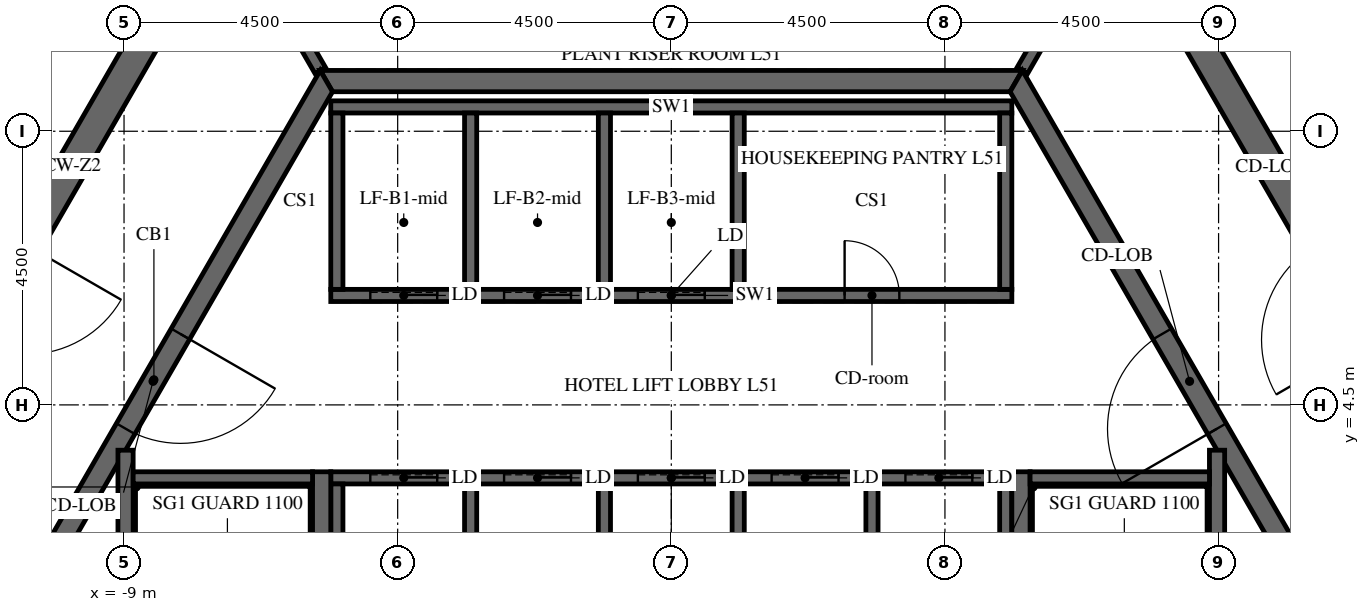
"""IFC4 building model, lengths in metres.
Left out: names, types, materials, properties, quantities, classifications, styles, units other than length and angle.
Written with IfcOpenShell. Run it as: python <this file> out.ifc"""

import sys

from ifc_helpers import new_model, si_unit, direction, frame, frame_2d, origin, place, context, subcontext, project, spatial, polyline, rectangle, outline, extrude, element, fill, save


model = new_model("IFC4")
c1 = context("Model", 3, precision=1e-05, world=origin(), true_north=direction((0.0, 1.0)))
c2 = subcontext(c1, "Body", "Model", "MODEL_VIEW")
j1 = project(units=[si_unit("LENGTHUNIT", "METRE"), si_unit("PLANEANGLEUNIT", "RADIAN")], contexts=[c1])
p1 = place(None, origin())
s1 = spatial("IfcSite", under=j1, at=p1, CompositionType="ELEMENT")
p2 = place(p1, origin())
s2 = spatial("IfcBuilding", under=s1, at=p2, CompositionType="ELEMENT")
p3 = place(p2, frame((0.0, 0.0, 215.1)))
s3 = spatial("IfcBuildingStorey", under=s2, at=p3, CompositionType="ELEMENT", Elevation=215.1)
p4 = place(p3, frame((-7.361, 12.75, -0.15), z_axis=(0.0, 0.0, 1.0), x_axis=(-0.50000571537, -0.866022103989, 0.0)))
e1 = element("IfcWall", 1, at=p4, inside=s3, PredefinedType="SHEAR", context=c2, shape_type="SweptSolid", body=[
    extrude(outline(polyline([(-0.144, -0.25), (14.867, -0.25), (14.578, 0.25), (0.144, 0.25), (-0.144, -0.25)])), origin(), (0.0, 0.0, 1.0), 3.9),
])
p5 = place(p4, frame((6.49, 0.0, 0.15)))
e2 = element("IfcOpeningElement", 2, at=p5, cuts=e1, PredefinedType="OPENING", context=c2, shape_type="SweptSolid", body=[
    extrude(rectangle(XDim=1.8, YDim=2.4, at=frame_2d((0.9, 1.2))), frame((0.0, 0.26, 0.0), z_axis=(0.0, -1.0, 0.0), x_axis=(1.0, 0.0, 0.0)), (0.0, 0.0, 1.0), 0.52),
])
p6 = place(p3, frame((14.722, 0.0, -0.15), z_axis=(0.0, 0.0, 1.0), x_axis=(-0.50000571537, 0.866022103989, 0.0)))
e3 = element("IfcWall", 3, at=p6, inside=s3, PredefinedType="SHEAR", context=c2, shape_type="SweptSolid", body=[
    extrude(outline(polyline([(-0.144, -0.25), (14.867, -0.25), (14.578, 0.25), (0.144, 0.25), (-0.144, -0.25)])), origin(), (0.0, 0.0, 1.0), 3.9),
])
p7 = place(p6, frame((6.432, 0.0, 0.15)))
e4 = element("IfcOpeningElement", 4, at=p7, cuts=e3, PredefinedType="OPENING", context=c2, shape_type="SweptSolid", body=[
    extrude(rectangle(XDim=1.8, YDim=2.4, at=frame_2d((0.9, 1.2))), frame((0.0, 0.26, 0.0), z_axis=(0.0, -1.0, 0.0), x_axis=(1.0, 0.0, 0.0)), (0.0, 0.0, 1.0), 0.52),
])
p8 = place(p3, frame((-5.673, 9.825, -0.15), z_axis=(0.0, 0.0, 1.0), x_axis=(-0.499995046907, -0.866028263435, 0.0)))
e5 = element("IfcWall", 5, at=p8, inside=s3, PredefinedType="SHEAR", context=c2, shape_type="SweptSolid", body=[
    extrude(outline(polyline([(-0.101, -0.175), (11.446, -0.175), (11.244, 0.175), (0.101, 0.175), (-0.101, -0.175)])), origin(), (0.0, 0.0, 1.0), 3.9),
])
p9 = place(p8, frame((4.801, 0.0, 0.15)))
e6 = element("IfcOpeningElement", 6, at=p9, cuts=e5, PredefinedType="OPENING", context=c2, shape_type="SweptSolid", body=[
    extrude(rectangle(XDim=1.8, YDim=2.4, at=frame_2d((0.9, 1.2))), frame((0.0, 0.185, 0.0), z_axis=(0.0, -1.0, 0.0), x_axis=(1.0, 0.0, 0.0)), (0.0, 0.0, 1.0), 0.37),
])
p10 = place(p3, frame((11.345, 0.0, -0.15), z_axis=(0.0, 0.0, 1.0), x_axis=(-0.499995046907, 0.866028263435, 0.0)))
e7 = element("IfcWall", 7, at=p10, inside=s3, PredefinedType="SHEAR", context=c2, shape_type="SweptSolid", body=[
    extrude(outline(polyline([(-0.101, -0.175), (11.446, -0.175), (11.244, 0.175), (0.101, 0.175), (-0.101, -0.175)])), origin(), (0.0, 0.0, 1.0), 3.9),
])
p11 = place(p10, frame((4.744, 0.0, 0.15)))
e8 = element("IfcOpeningElement", 8, at=p11, cuts=e7, PredefinedType="OPENING", context=c2, shape_type="SweptSolid", body=[
    extrude(rectangle(XDim=1.8, YDim=2.4, at=frame_2d((0.9, 1.2))), frame((0.0, 0.185, 0.0), z_axis=(0.0, -1.0, 0.0), x_axis=(1.0, 0.0, 0.0)), (0.0, 0.0, 1.0), 0.37),
])
p12 = place(p3, frame((5.673, 9.825, -0.15), z_axis=(0.0, 0.0, 1.0), x_axis=(-1.0, 0.0, 0.0)))
e9 = element("IfcWall", 9, at=p12, inside=s3, PredefinedType="SHEAR", context=c2, shape_type="SweptSolid", body=[
    extrude(outline(polyline([(-0.101, -0.175), (11.446, -0.175), (11.244, 0.175), (0.101, 0.175), (-0.101, -0.175)])), origin(), (0.0, 0.0, 1.0), 3.9),
])
p13 = place(p3, frame((-5.6, 6.3, -0.25), z_axis=(0.0, 0.0, 1.0), x_axis=(1.0, 0.0, 0.0)))
e10 = element("IfcWall", 10, at=p13, inside=s3, PredefinedType="SHEAR", context=c2, shape_type="SweptSolid", body=[
    extrude(rectangle(XDim=11.2, YDim=0.2, at=frame_2d((5.6, 0.0))), origin(), (0.0, 0.0, 1.0), 3.9),
])
p14 = place(p13, frame((8.45, 0.0, 0.25)))
e11 = element("IfcOpeningElement", 11, at=p14, cuts=e10, PredefinedType="OPENING", context=c2, shape_type="SweptSolid", body=[
    extrude(rectangle(XDim=0.9, YDim=2.1, at=frame_2d((0.45, 1.05))), frame((0.0, 0.11, 0.0), z_axis=(0.0, -1.0, 0.0), x_axis=(1.0, 0.0, 0.0)), (0.0, 0.0, 1.0), 0.22),
])
p15 = place(p13, frame((0.65, 0.0, 0.25)))
e12 = element("IfcOpeningElement", 12, at=p15, cuts=e10, PredefinedType="OPENING", context=c2, shape_type="SweptSolid", body=[
    extrude(rectangle(XDim=1.1, YDim=2.1, at=frame_2d((0.55, 1.05))), frame((0.0, 0.11, 0.0), z_axis=(0.0, -1.0, 0.0), x_axis=(1.0, 0.0, 0.0)), (0.0, 0.0, 1.0), 0.22),
])
p16 = place(p13, frame((2.85, 0.0, 0.25)))
e13 = element("IfcOpeningElement", 13, at=p16, cuts=e10, PredefinedType="OPENING", context=c2, shape_type="SweptSolid", body=[
    extrude(rectangle(XDim=1.1, YDim=2.1, at=frame_2d((0.55, 1.05))), frame((0.0, 0.11, 0.0), z_axis=(0.0, -1.0, 0.0), x_axis=(1.0, 0.0, 0.0)), (0.0, 0.0, 1.0), 0.22),
])
p17 = place(p13, frame((5.05, 0.0, 0.25)))
e14 = element("IfcOpeningElement", 14, at=p17, cuts=e10, PredefinedType="OPENING", context=c2, shape_type="SweptSolid", body=[
    extrude(rectangle(XDim=1.1, YDim=2.1, at=frame_2d((0.55, 1.05))), frame((0.0, 0.11, 0.0), z_axis=(0.0, -1.0, 0.0), x_axis=(1.0, 0.0, 0.0)), (0.0, 0.0, 1.0), 0.22),
])
p18 = place(p3, frame((-5.6, 9.4, -0.25), z_axis=(0.0, 0.0, 1.0), x_axis=(1.0, 0.0, 0.0)))
e15 = element("IfcWall", 15, at=p18, inside=s3, PredefinedType="SHEAR", context=c2, shape_type="SweptSolid", body=[
    extrude(rectangle(XDim=11.2, YDim=0.2, at=frame_2d((5.6, 0.0))), origin(), (0.0, 0.0, 1.0), 3.9),
])
for number, where, z_axis, x_axis in (
    (16, (-5.5, 6.4, -0.25), (0.0, 0.0, 1.0), (0.0, 1.0, 0.0)),
    (17, (-3.3, 6.4, -0.25), (0.0, 0.0, 1.0), (0.0, 1.0, 0.0)),
    (18, (-1.1, 6.4, -0.25), (0.0, 0.0, 1.0), (0.0, 1.0, 0.0)),
    (19, (1.1, 6.4, -0.25), (0.0, 0.0, 1.0), (0.0, 1.0, 0.0)),
    (20, (5.5, 6.4, -0.25), (0.0, 0.0, 1.0), (0.0, 1.0, 0.0)),
):
    element("IfcWall", number, at=place(p3, frame(where, z_axis=z_axis, x_axis=x_axis)), inside=s3, PredefinedType="SHEAR", context=c2, shape_type="SweptSolid", body=[
        extrude(rectangle(XDim=2.9, YDim=0.2, at=frame_2d((1.45, 0.0))), origin(), (0.0, 0.0, 1.0), 3.9),
    ])
p19 = place(p3, frame((-5.6, 3.3, -0.25), z_axis=(0.0, 0.0, 1.0), x_axis=(1.0, 0.0, 0.0)))
e21 = element("IfcWall", 21, at=p19, inside=s3, PredefinedType="SHEAR", context=c2, shape_type="SweptSolid", body=[
    extrude(rectangle(XDim=11.2, YDim=0.2, at=frame_2d((5.6, 0.0))), origin(), (0.0, 0.0, 1.0), 3.9),
])
p20 = place(p19, frame((0.65, 0.0, 0.25)))
e22 = element("IfcOpeningElement", 22, at=p20, cuts=e21, PredefinedType="OPENING", context=c2, shape_type="SweptSolid", body=[
    extrude(rectangle(XDim=1.1, YDim=2.1, at=frame_2d((0.55, 1.05))), frame((0.0, 0.11, 0.0), z_axis=(0.0, -1.0, 0.0), x_axis=(1.0, 0.0, 0.0)), (0.0, 0.0, 1.0), 0.22),
])
p21 = place(p19, frame((2.85, 0.0, 0.25)))
e23 = element("IfcOpeningElement", 23, at=p21, cuts=e21, PredefinedType="OPENING", context=c2, shape_type="SweptSolid", body=[
    extrude(rectangle(XDim=1.1, YDim=2.1, at=frame_2d((0.55, 1.05))), frame((0.0, 0.11, 0.0), z_axis=(0.0, -1.0, 0.0), x_axis=(1.0, 0.0, 0.0)), (0.0, 0.0, 1.0), 0.22),
])
p22 = place(p19, frame((5.05, 0.0, 0.25)))
e24 = element("IfcOpeningElement", 24, at=p22, cuts=e21, PredefinedType="OPENING", context=c2, shape_type="SweptSolid", body=[
    extrude(rectangle(XDim=1.1, YDim=2.1, at=frame_2d((0.55, 1.05))), frame((0.0, 0.11, 0.0), z_axis=(0.0, -1.0, 0.0), x_axis=(1.0, 0.0, 0.0)), (0.0, 0.0, 1.0), 0.22),
])
p23 = place(p19, frame((7.25, 0.0, 0.25)))
e25 = element("IfcOpeningElement", 25, at=p23, cuts=e21, PredefinedType="OPENING", context=c2, shape_type="SweptSolid", body=[
    extrude(rectangle(XDim=1.1, YDim=2.1, at=frame_2d((0.55, 1.05))), frame((0.0, 0.11, 0.0), z_axis=(0.0, -1.0, 0.0), x_axis=(1.0, 0.0, 0.0)), (0.0, 0.0, 1.0), 0.22),
])
p24 = place(p19, frame((9.45, 0.0, 0.25)))
e26 = element("IfcOpeningElement", 26, at=p24, cuts=e21, PredefinedType="OPENING", context=c2, shape_type="SweptSolid", body=[
    extrude(rectangle(XDim=1.1, YDim=2.1, at=frame_2d((0.55, 1.05))), frame((0.0, 0.11, 0.0), z_axis=(0.0, -1.0, 0.0), x_axis=(1.0, 0.0, 0.0)), (0.0, 0.0, 1.0), 0.22),
])
for number, where, z_axis, x_axis in (
    (27, (-5.5, 0.1, -0.25), (0.0, 0.0, 1.0), (0.0, 1.0, 0.0)),
    (28, (-3.3, 0.1, -0.25), (0.0, 0.0, 1.0), (0.0, 1.0, 0.0)),
    (29, (-1.1, 0.1, -0.25), (0.0, 0.0, 1.0), (0.0, 1.0, 0.0)),
    (30, (1.1, 0.1, -0.25), (0.0, 0.0, 1.0), (0.0, 1.0, 0.0)),
    (31, (3.3, 0.1, -0.25), (0.0, 0.0, 1.0), (0.0, 1.0, 0.0)),
    (32, (5.5, 0.1, -0.25), (0.0, 0.0, 1.0), (0.0, 1.0, 0.0)),
):
    element("IfcWall", number, at=place(p3, frame(where, z_axis=z_axis, x_axis=x_axis)), inside=s3, PredefinedType="SHEAR", context=c2, shape_type="SweptSolid", body=[
        extrude(rectangle(XDim=3.1, YDim=0.2, at=frame_2d((1.55, 0.0))), origin(), (0.0, 0.0, 1.0), 3.9),
    ])
for number, where, z_axis, x_axis in (
    (33, (5.773, 10.0, -0.15), (0.0, 0.0, 1.0), (0.5, 0.866, 0.0)),
    (34, (-5.773, 10.0, -0.15), (0.0, 0.0, 1.0), (-0.5, 0.866, 0.0)),
):
    element("IfcWall", number, at=place(p3, frame(where, z_axis=z_axis, x_axis=x_axis)), inside=s3, PredefinedType="SHEAR", context=c2, shape_type="SweptSolid", body=[
        extrude(rectangle(XDim=2.887, YDim=0.2, at=frame_2d((1.443, 0.0))), origin(), (0.0, 0.0, 1.0), 3.9),
    ])
p25 = place(p3, frame((5.75, -3.4, -0.25), z_axis=(0.0, 0.0, 1.0), x_axis=(0.0, 1.0, 0.0)))
e35 = element("IfcWall", 35, at=p25, inside=s3, PredefinedType="SHEAR", context=c2, shape_type="SweptSolid", body=[
    extrude(rectangle(XDim=6.8, YDim=0.3, at=frame_2d((3.4, 0.0))), origin(), (0.0, 0.0, 1.0), 3.9),
])
p26 = place(p3, frame((8.975, -3.755, -0.25), z_axis=(0.0, 0.0, 1.0), x_axis=(0.0, 1.0, 0.0)))
e36 = element("IfcWall", 36, at=p26, inside=s3, PredefinedType="SHEAR", context=c2, shape_type="SweptSolid", body=[
    extrude(rectangle(XDim=7.51, YDim=0.25, at=frame_2d((3.755, 0.0))), origin(), (0.0, 0.0, 1.0), 3.9),
])
p27 = place(p3, frame((5.9, 3.3, -0.25), z_axis=(0.0, 0.0, 1.0), x_axis=(1.0, 0.0, 0.0)))
e37 = element("IfcWall", 37, at=p27, inside=s3, PredefinedType="SHEAR", context=c2, shape_type="SweptSolid", body=[
    extrude(rectangle(XDim=2.95, YDim=0.2, at=frame_2d((1.475, 0.0))), origin(), (0.0, 0.0, 1.0), 3.9),
])
p28 = place(p3, frame((-5.75, -3.4, -0.25), z_axis=(0.0, 0.0, 1.0), x_axis=(0.0, 1.0, 0.0)))
e38 = element("IfcWall", 38, at=p28, inside=s3, PredefinedType="SHEAR", context=c2, shape_type="SweptSolid", body=[
    extrude(rectangle(XDim=6.8, YDim=0.3, at=frame_2d((3.4, 0.0))), origin(), (0.0, 0.0, 1.0), 3.9),
])
p29 = place(p3, frame((-8.975, -3.755, -0.25), z_axis=(0.0, 0.0, 1.0), x_axis=(0.0, 1.0, 0.0)))
e39 = element("IfcWall", 39, at=p29, inside=s3, PredefinedType="SHEAR", context=c2, shape_type="SweptSolid", body=[
    extrude(rectangle(XDim=7.51, YDim=0.25, at=frame_2d((3.755, 0.0))), origin(), (0.0, 0.0, 1.0), 3.9),
])
p30 = place(p3, frame((-8.85, 3.3, -0.25), z_axis=(0.0, 0.0, 1.0), x_axis=(1.0, 0.0, 0.0)))
e40 = element("IfcWall", 40, at=p30, inside=s3, PredefinedType="SHEAR", context=c2, shape_type="SweptSolid", body=[
    extrude(rectangle(XDim=2.95, YDim=0.2, at=frame_2d((1.475, 0.0))), origin(), (0.0, 0.0, 1.0), 3.9),
])
p31 = place(p3, frame((-8.588, 14.725, 0.0), z_axis=(0.0, 0.0, 1.0), x_axis=(-0.499999403554, -0.866025748143, 0.0)))
e41 = element("IfcWall", 41, at=p31, inside=s3, PredefinedType="PARTITIONING", context=c2, shape_type="SweptSolid", body=[
    extrude(rectangle(XDim=14.549, YDim=0.15, at=frame_2d((7.275, 0.0))), origin(), (0.0, 0.0, 1.0), 2.988),
])
p32 = place(p31, frame((1.781, 0.0, 0.0)))
e42 = element("IfcOpeningElement", 42, at=p32, cuts=e41, PredefinedType="OPENING", context=c2, shape_type="SweptSolid", body=[
    extrude(rectangle(XDim=1.0, YDim=2.1, at=frame_2d((0.5, 1.05))), frame((0.0, 0.085, 0.0), z_axis=(0.0, -1.0, 0.0), x_axis=(1.0, 0.0, 0.0)), (0.0, 0.0, 1.0), 0.17),
])
p33 = place(p31, frame((8.705, 0.0, 0.0)))
e43 = element("IfcOpeningElement", 43, at=p33, cuts=e41, PredefinedType="OPENING", context=c2, shape_type="SweptSolid", body=[
    extrude(rectangle(XDim=1.0, YDim=2.1, at=frame_2d((0.5, 1.05))), frame((0.0, 0.085, 0.0), z_axis=(0.0, -1.0, 0.0), x_axis=(1.0, 0.0, 0.0)), (0.0, 0.0, 1.0), 0.17),
])
p34 = place(p3, frame((17.046, 0.075, 0.0), z_axis=(0.0, 0.0, 1.0), x_axis=(-0.500008833422, 0.866020303746, 0.0)))
e44 = element("IfcWall", 44, at=p34, inside=s3, PredefinedType="PARTITIONING", context=c2, shape_type="SweptSolid", body=[
    extrude(rectangle(XDim=14.636, YDim=0.15, at=frame_2d((7.318, 0.0))), origin(), (0.0, 0.0, 1.0), 2.988),
])
p35 = place(p34, frame((9.07, 0.0, 0.0)))
e45 = element("IfcOpeningElement", 45, at=p35, cuts=e44, PredefinedType="OPENING", context=c2, shape_type="SweptSolid", body=[
    extrude(rectangle(XDim=1.0, YDim=2.1, at=frame_2d((0.5, 1.05))), frame((0.0, 0.085, 0.0), z_axis=(0.0, -1.0, 0.0), x_axis=(1.0, 0.0, 0.0)), (0.0, 0.0, 1.0), 0.17),
])
p36 = place(p9, origin())
e46 = element("IfcDoor", 46, at=p36, inside=s3, OperationType="DOUBLE_DOOR_SINGLE_SWING", PredefinedType="DOOR", context=c2, shape_type="SweptSolid", body=[
    extrude(rectangle(XDim=1.8, YDim=2.4, at=frame_2d((0.9, 1.2))), frame((0.0, 0.025, 0.0), z_axis=(0.0, -1.0, 0.0), x_axis=(1.0, 0.0, 0.0)), (0.0, 0.0, 1.0), 0.05),
])
fill(e6, e46)
p37 = place(p11, origin())
e47 = element("IfcDoor", 47, at=p37, inside=s3, OperationType="DOUBLE_DOOR_SINGLE_SWING", PredefinedType="DOOR", context=c2, shape_type="SweptSolid", body=[
    extrude(rectangle(XDim=1.8, YDim=2.4, at=frame_2d((0.9, 1.2))), frame((0.0, 0.025, 0.0), z_axis=(0.0, -1.0, 0.0), x_axis=(1.0, 0.0, 0.0)), (0.0, 0.0, 1.0), 0.05),
])
fill(e8, e47)
p38 = place(p14, origin())
e48 = element("IfcDoor", 48, at=p38, inside=s3, OperationType="SINGLE_SWING_LEFT", PredefinedType="DOOR", context=c2, shape_type="SweptSolid", body=[
    extrude(rectangle(XDim=0.9, YDim=2.1, at=frame_2d((0.45, 1.05))), frame((0.0, 0.025, 0.0), z_axis=(0.0, -1.0, 0.0), x_axis=(1.0, 0.0, 0.0)), (0.0, 0.0, 1.0), 0.05),
])
fill(e11, e48)
p39 = place(p15, origin())
e49 = element("IfcDoor", 49, at=p39, inside=s3, OperationType="SLIDING_TO_LEFT", PredefinedType="DOOR", context=c2, shape_type="SweptSolid", body=[
    extrude(rectangle(XDim=1.1, YDim=2.1, at=frame_2d((0.55, 1.05))), frame((0.0, 0.025, 0.0), z_axis=(0.0, -1.0, 0.0), x_axis=(1.0, 0.0, 0.0)), (0.0, 0.0, 1.0), 0.05),
])
fill(e12, e49)
p40 = place(p16, origin())
e50 = element("IfcDoor", 50, at=p40, inside=s3, OperationType="SLIDING_TO_LEFT", PredefinedType="DOOR", context=c2, shape_type="SweptSolid", body=[
    extrude(rectangle(XDim=1.1, YDim=2.1, at=frame_2d((0.55, 1.05))), frame((0.0, 0.025, 0.0), z_axis=(0.0, -1.0, 0.0), x_axis=(1.0, 0.0, 0.0)), (0.0, 0.0, 1.0), 0.05),
])
fill(e13, e50)
p41 = place(p17, origin())
e51 = element("IfcDoor", 51, at=p41, inside=s3, OperationType="SLIDING_TO_LEFT", PredefinedType="DOOR", context=c2, shape_type="SweptSolid", body=[
    extrude(rectangle(XDim=1.1, YDim=2.1, at=frame_2d((0.55, 1.05))), frame((0.0, 0.025, 0.0), z_axis=(0.0, -1.0, 0.0), x_axis=(1.0, 0.0, 0.0)), (0.0, 0.0, 1.0), 0.05),
])
fill(e14, e51)
p42 = place(p20, origin())
e52 = element("IfcDoor", 52, at=p42, inside=s3, OperationType="SLIDING_TO_LEFT", PredefinedType="DOOR", context=c2, shape_type="SweptSolid", body=[
    extrude(rectangle(XDim=1.1, YDim=2.1, at=frame_2d((0.55, 1.05))), frame((0.0, 0.025, 0.0), z_axis=(0.0, -1.0, 0.0), x_axis=(1.0, 0.0, 0.0)), (0.0, 0.0, 1.0), 0.05),
])
fill(e22, e52)
p43 = place(p21, origin())
e53 = element("IfcDoor", 53, at=p43, inside=s3, OperationType="SLIDING_TO_LEFT", PredefinedType="DOOR", context=c2, shape_type="SweptSolid", body=[
    extrude(rectangle(XDim=1.1, YDim=2.1, at=frame_2d((0.55, 1.05))), frame((0.0, 0.025, 0.0), z_axis=(0.0, -1.0, 0.0), x_axis=(1.0, 0.0, 0.0)), (0.0, 0.0, 1.0), 0.05),
])
fill(e23, e53)
p44 = place(p22, origin())
e54 = element("IfcDoor", 54, at=p44, inside=s3, OperationType="SLIDING_TO_LEFT", PredefinedType="DOOR", context=c2, shape_type="SweptSolid", body=[
    extrude(rectangle(XDim=1.1, YDim=2.1, at=frame_2d((0.55, 1.05))), frame((0.0, 0.025, 0.0), z_axis=(0.0, -1.0, 0.0), x_axis=(1.0, 0.0, 0.0)), (0.0, 0.0, 1.0), 0.05),
])
fill(e24, e54)
p45 = place(p23, origin())
e55 = element("IfcDoor", 55, at=p45, inside=s3, OperationType="SLIDING_TO_LEFT", PredefinedType="DOOR", context=c2, shape_type="SweptSolid", body=[
    extrude(rectangle(XDim=1.1, YDim=2.1, at=frame_2d((0.55, 1.05))), frame((0.0, 0.025, 0.0), z_axis=(0.0, -1.0, 0.0), x_axis=(1.0, 0.0, 0.0)), (0.0, 0.0, 1.0), 0.05),
])
fill(e25, e55)
p46 = place(p24, origin())
e56 = element("IfcDoor", 56, at=p46, inside=s3, OperationType="SLIDING_TO_LEFT", PredefinedType="DOOR", context=c2, shape_type="SweptSolid", body=[
    extrude(rectangle(XDim=1.1, YDim=2.1, at=frame_2d((0.55, 1.05))), frame((0.0, 0.025, 0.0), z_axis=(0.0, -1.0, 0.0), x_axis=(1.0, 0.0, 0.0)), (0.0, 0.0, 1.0), 0.05),
])
fill(e26, e56)
save(model, sys.argv[1])
